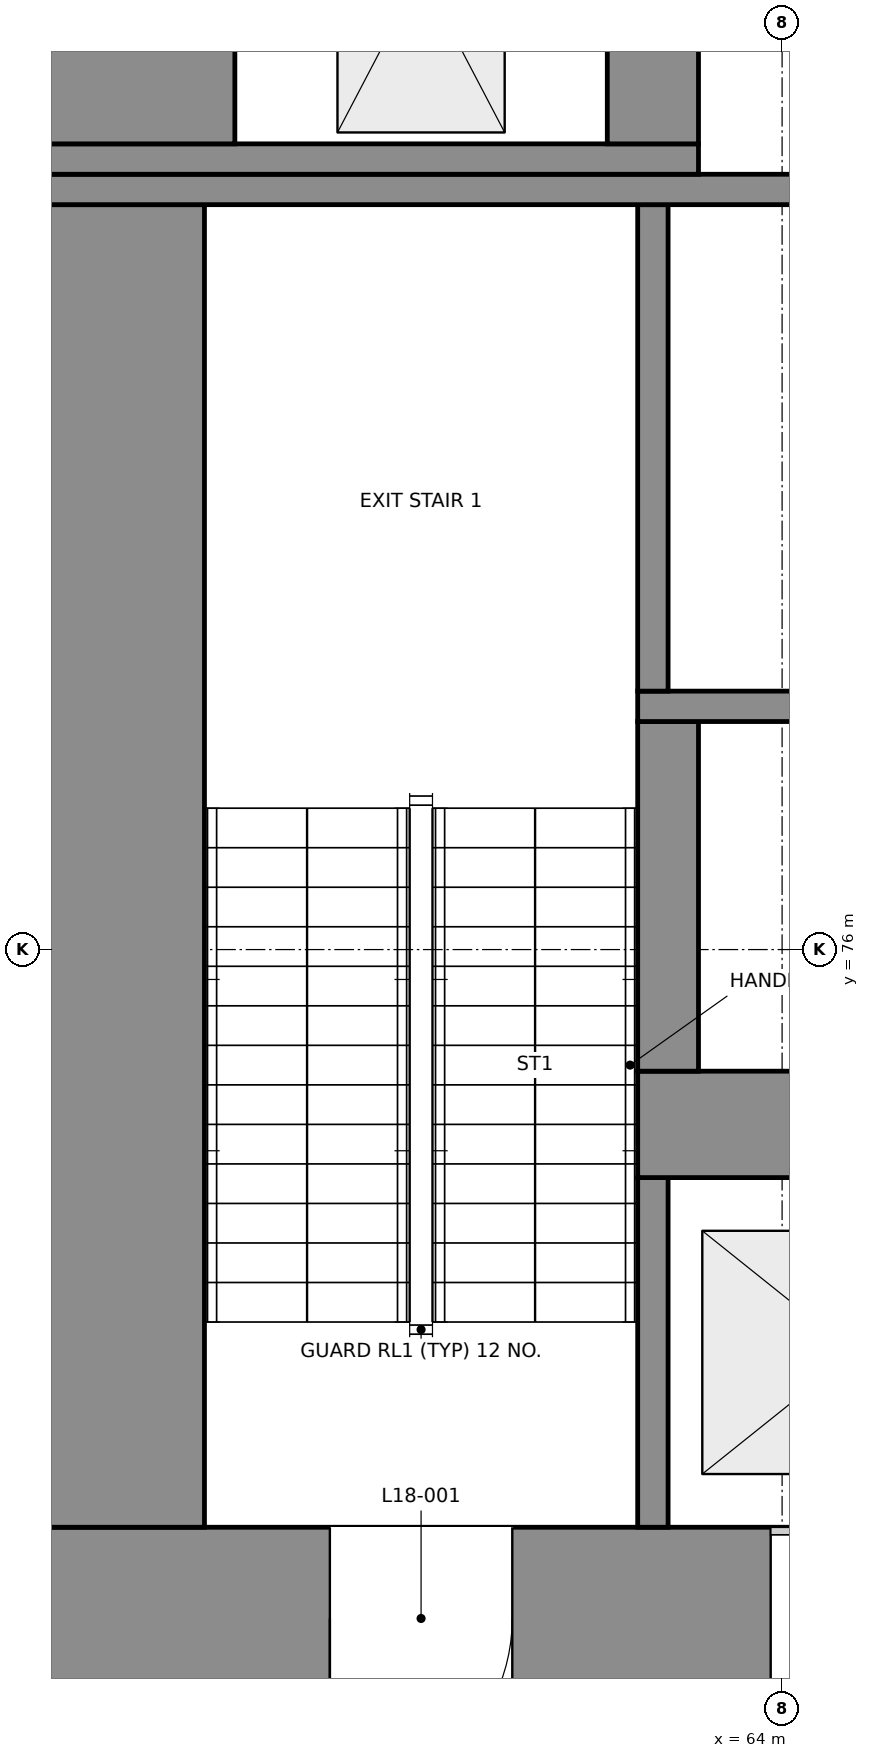
"""IFC4 building model, lengths in metres.
Left out: names, types, materials, properties, quantities, classifications, styles, units other than length and angle.
Written with IfcOpenShell. Run it as: python <this file> out.ifc"""

import sys

from ifc_helpers import new_model, si_unit, direction, frame, frame_2d, origin, place, context, subcontext, project, spatial, rectangle, extrude, element, fill, save


model = new_model("IFC4")
c1 = context("Model", 3, precision=1e-05, world=origin(), true_north=direction((0.0, 1.0)))
c2 = subcontext(c1, "Body", "Model", "MODEL_VIEW")
j1 = project(units=[si_unit("LENGTHUNIT", "METRE"), si_unit("PLANEANGLEUNIT", "RADIAN")], contexts=[c1])
p1 = place(None, origin())
s1 = spatial("IfcSite", under=j1, at=p1, CompositionType="ELEMENT")
p2 = place(p1, origin())
s2 = spatial("IfcBuilding", under=s1, at=p2, CompositionType="ELEMENT")
p3 = place(p2, frame((0.0, 0.0, 85.8)))
s3 = spatial("IfcBuildingStorey", under=s2, at=p3, CompositionType="ELEMENT", Elevation=85.8)
p4 = place(p3, frame((59.0, 71.6, 0.0), z_axis=(0.0, 0.0, 1.0), x_axis=(1.0, 0.0, 0.0)))
e1 = element("IfcWall", 1, at=p4, inside=s3, PredefinedType="SHEAR", context=c2, shape_type="SweptSolid", body=[
    extrude(rectangle(XDim=22.0, YDim=1.2, at=frame_2d((11.0, 0.0))), origin(), (0.0, 0.0, 1.0), 5.0),
])
p5 = place(p4, frame((2.025, 0.0, 0.0)))
e2 = element("IfcOpeningElement", 2, at=p5, cuts=e1, PredefinedType="OPENING", context=c2, shape_type="SweptSolid", body=[
    extrude(rectangle(XDim=1.2, YDim=2.1, at=frame_2d((0.6, 1.05))), frame((0.0, 0.61, 0.0), z_axis=(0.0, -1.0, 0.0), x_axis=(1.0, 0.0, 0.0)), (0.0, 0.0, 1.0), 1.22),
])
p6 = place(p4, frame((18.775, 0.0, 0.0)))
e3 = element("IfcOpeningElement", 3, at=p6, cuts=e1, PredefinedType="OPENING", context=c2, shape_type="SweptSolid", body=[
    extrude(rectangle(XDim=1.2, YDim=2.1, at=frame_2d((0.6, 1.05))), frame((0.0, 0.61, 0.0), z_axis=(0.0, -1.0, 0.0), x_axis=(1.0, 0.0, 0.0)), (0.0, 0.0, 1.0), 1.22),
])
p7 = place(p4, frame((10.0, 0.0, 0.0)))
e4 = element("IfcOpeningElement", 4, at=p7, cuts=e1, PredefinedType="OPENING", context=c2, shape_type="SweptSolid", body=[
    extrude(rectangle(XDim=2.0, YDim=2.1, at=frame_2d((1.0, 1.05))), frame((0.0, 0.61, 0.0), z_axis=(0.0, -1.0, 0.0), x_axis=(1.0, 0.0, 0.0)), (0.0, 0.0, 1.0), 1.22),
])
p8 = place(p4, frame((4.925, 0.0, 0.0)))
e5 = element("IfcOpeningElement", 5, at=p8, cuts=e1, PredefinedType="OPENING", context=c2, shape_type="SweptSolid", body=[
    extrude(rectangle(XDim=1.1, YDim=2.1, at=frame_2d((0.55, 1.05))), frame((0.0, 0.61, 0.0), z_axis=(0.0, -1.0, 0.0), x_axis=(1.0, 0.0, 0.0)), (0.0, 0.0, 1.0), 1.22),
])
p9 = place(p4, frame((7.575, 0.0, 0.0)))
e6 = element("IfcOpeningElement", 6, at=p9, cuts=e1, PredefinedType="OPENING", context=c2, shape_type="SweptSolid", body=[
    extrude(rectangle(XDim=1.1, YDim=2.1, at=frame_2d((0.55, 1.05))), frame((0.0, 0.61, 0.0), z_axis=(0.0, -1.0, 0.0), x_axis=(1.0, 0.0, 0.0)), (0.0, 0.0, 1.0), 1.22),
])
p10 = place(p4, frame((13.125, 0.0, 0.0)))
e7 = element("IfcOpeningElement", 7, at=p10, cuts=e1, PredefinedType="OPENING", context=c2, shape_type="SweptSolid", body=[
    extrude(rectangle(XDim=1.1, YDim=2.1, at=frame_2d((0.55, 1.05))), frame((0.0, 0.61, 0.0), z_axis=(0.0, -1.0, 0.0), x_axis=(1.0, 0.0, 0.0)), (0.0, 0.0, 1.0), 1.22),
])
p11 = place(p4, frame((15.775, 0.0, 0.0)))
e8 = element("IfcOpeningElement", 8, at=p11, cuts=e1, PredefinedType="OPENING", context=c2, shape_type="SweptSolid", body=[
    extrude(rectangle(XDim=1.1, YDim=2.1, at=frame_2d((0.55, 1.05))), frame((0.0, 0.61, 0.0), z_axis=(0.0, -1.0, 0.0), x_axis=(1.0, 0.0, 0.0)), (0.0, 0.0, 1.0), 1.22),
])
p12 = place(p3, frame((59.6, 72.2, 0.0), z_axis=(0.0, 0.0, 1.0), x_axis=(0.0, 1.0, 0.0)))
e9 = element("IfcWall", 9, at=p12, inside=s3, PredefinedType="SHEAR", context=c2, shape_type="SweptSolid", body=[
    extrude(rectangle(XDim=8.7, YDim=1.2, at=frame_2d((4.35, 0.0))), origin(), (0.0, 0.0, 1.0), 5.0),
])
p13 = place(p3, frame((63.15, 72.2, 0.0), z_axis=(0.0, 0.0, 1.0), x_axis=(0.0, 1.0, 0.0)))
e10 = element("IfcWall", 10, at=p13, inside=s3, PredefinedType="SHEAR", context=c2, shape_type="SweptSolid", body=[
    extrude(rectangle(XDim=2.3, YDim=0.2, at=frame_2d((1.15, 0.0))), origin(), (0.0, 0.0, 1.0), 5.0),
])
p14 = place(p3, frame((63.05, 74.85, 0.0), z_axis=(0.0, 0.0, 1.0), x_axis=(1.0, 0.0, 0.0)))
e11 = element("IfcWall", 11, at=p14, inside=s3, PredefinedType="SHEAR", context=c2, shape_type="SweptSolid", body=[
    extrude(rectangle(XDim=5.7, YDim=0.7, at=frame_2d((2.85, 0.0))), origin(), (0.0, 0.0, 1.0), 5.0),
])
p15 = place(p3, frame((63.25, 75.2, 0.0), z_axis=(0.0, 0.0, 1.0), x_axis=(0.0, 1.0, 0.0)))
e12 = element("IfcWall", 12, at=p15, inside=s3, PredefinedType="SHEAR", context=c2, shape_type="SweptSolid", body=[
    extrude(rectangle(XDim=2.3, YDim=0.4, at=frame_2d((1.15, 0.0))), origin(), (0.0, 0.0, 1.0), 5.0),
])
p16 = place(p3, frame((63.05, 77.6, 0.0), z_axis=(0.0, 0.0, 1.0), x_axis=(1.0, 0.0, 0.0)))
e13 = element("IfcWall", 13, at=p16, inside=s3, PredefinedType="SHEAR", context=c2, shape_type="SweptSolid", body=[
    extrude(rectangle(XDim=5.7, YDim=0.2, at=frame_2d((2.85, 0.0))), origin(), (0.0, 0.0, 1.0), 5.0),
])
p17 = place(p16, frame((2.5, 0.0, 0.0)))
e14 = element("IfcOpeningElement", 14, at=p17, cuts=e13, PredefinedType="OPENING", context=c2, shape_type="SweptSolid", body=[
    extrude(rectangle(XDim=0.9, YDim=2.1, at=frame_2d((0.45, 1.05))), frame((0.0, 0.11, 0.0), z_axis=(0.0, -1.0, 0.0), x_axis=(1.0, 0.0, 0.0)), (0.0, 0.0, 1.0), 0.22),
])
p18 = place(p3, frame((63.15, 77.7, 0.0), z_axis=(0.0, 0.0, 1.0), x_axis=(0.0, 1.0, 0.0)))
e15 = element("IfcWall", 15, at=p18, inside=s3, PredefinedType="SHEAR", context=c2, shape_type="SweptSolid", body=[
    extrude(rectangle(XDim=3.2, YDim=0.2, at=frame_2d((1.6, 0.0))), origin(), (0.0, 0.0, 1.0), 5.0),
])
p19 = place(p3, frame((59.0, 81.0, 0.0), z_axis=(0.0, 0.0, 1.0), x_axis=(1.0, 0.0, 0.0)))
e16 = element("IfcWall", 16, at=p19, inside=s3, PredefinedType="SHEAR", context=c2, shape_type="SweptSolid", body=[
    extrude(rectangle(XDim=22.0, YDim=0.2, at=frame_2d((11.0, 0.0))), origin(), (0.0, 0.0, 1.0), 5.0),
])
p20 = place(p19, frame((15.725, 0.0, 0.0)))
e17 = element("IfcOpeningElement", 17, at=p20, cuts=e16, PredefinedType="OPENING", context=c2, shape_type="SweptSolid", body=[
    extrude(rectangle(XDim=1.1, YDim=2.1, at=frame_2d((0.55, 1.05))), frame((0.0, 0.11, 0.0), z_axis=(0.0, -1.0, 0.0), x_axis=(1.0, 0.0, 0.0)), (0.0, 0.0, 1.0), 0.22),
])
p21 = place(p3, frame((59.0, 81.2, 0.0), z_axis=(0.0, 0.0, 1.0), x_axis=(1.0, 0.0, 0.0)))
e18 = element("IfcWall", 18, at=p21, inside=s3, PredefinedType="SHEAR", context=c2, shape_type="SweptSolid", body=[
    extrude(rectangle(XDim=4.45, YDim=0.2, at=frame_2d((2.225, 0.0))), origin(), (0.0, 0.0, 1.0), 5.0),
])
p22 = place(p3, frame((59.7, 81.3, 0.0), z_axis=(0.0, 0.0, 1.0), x_axis=(0.0, 1.0, 0.0)))
e19 = element("IfcWall", 19, at=p22, inside=s3, PredefinedType="SHEAR", context=c2, shape_type="SweptSolid", body=[
    extrude(rectangle(XDim=2.25, YDim=1.4, at=frame_2d((1.125, 0.0))), origin(), (0.0, 0.0, 1.0), 5.0),
])
p23 = place(p3, frame((63.15, 81.3, 0.0), z_axis=(0.0, 0.0, 1.0), x_axis=(0.0, 1.0, 0.0)))
e20 = element("IfcWall", 20, at=p23, inside=s3, PredefinedType="SHEAR", context=c2, shape_type="SweptSolid", body=[
    extrude(rectangle(XDim=2.25, YDim=0.6, at=frame_2d((1.125, 0.0))), origin(), (0.0, 0.0, 1.0), 5.0),
])
p24 = place(p5, frame((1.2, 0.0, 0.0), z_axis=(0.0, 0.0, 1.0), x_axis=(-1.0, 0.0, 0.0)))
e21 = element("IfcDoor", 21, at=p24, inside=s3, OperationType="SINGLE_SWING_RIGHT", PredefinedType="DOOR", context=c2, shape_type="SweptSolid", body=[
    extrude(rectangle(XDim=1.2, YDim=2.1, at=frame_2d((0.6, 1.05))), frame((0.0, 0.025, 0.0), z_axis=(0.0, -1.0, 0.0), x_axis=(1.0, 0.0, 0.0)), (0.0, 0.0, 1.0), 0.05),
])
fill(e2, e21)
p25 = place(p8, origin())
e22 = element("IfcDoor", 22, at=p25, inside=s3, OperationType="DOUBLE_DOOR_SLIDING", PredefinedType="DOOR", context=c2, shape_type="SweptSolid", body=[
    extrude(rectangle(XDim=1.1, YDim=2.1, at=frame_2d((0.55, 1.05))), frame((0.0, 0.025, 0.0), z_axis=(0.0, -1.0, 0.0), x_axis=(1.0, 0.0, 0.0)), (0.0, 0.0, 1.0), 0.05),
])
fill(e5, e22)
save(model, sys.argv[1])
